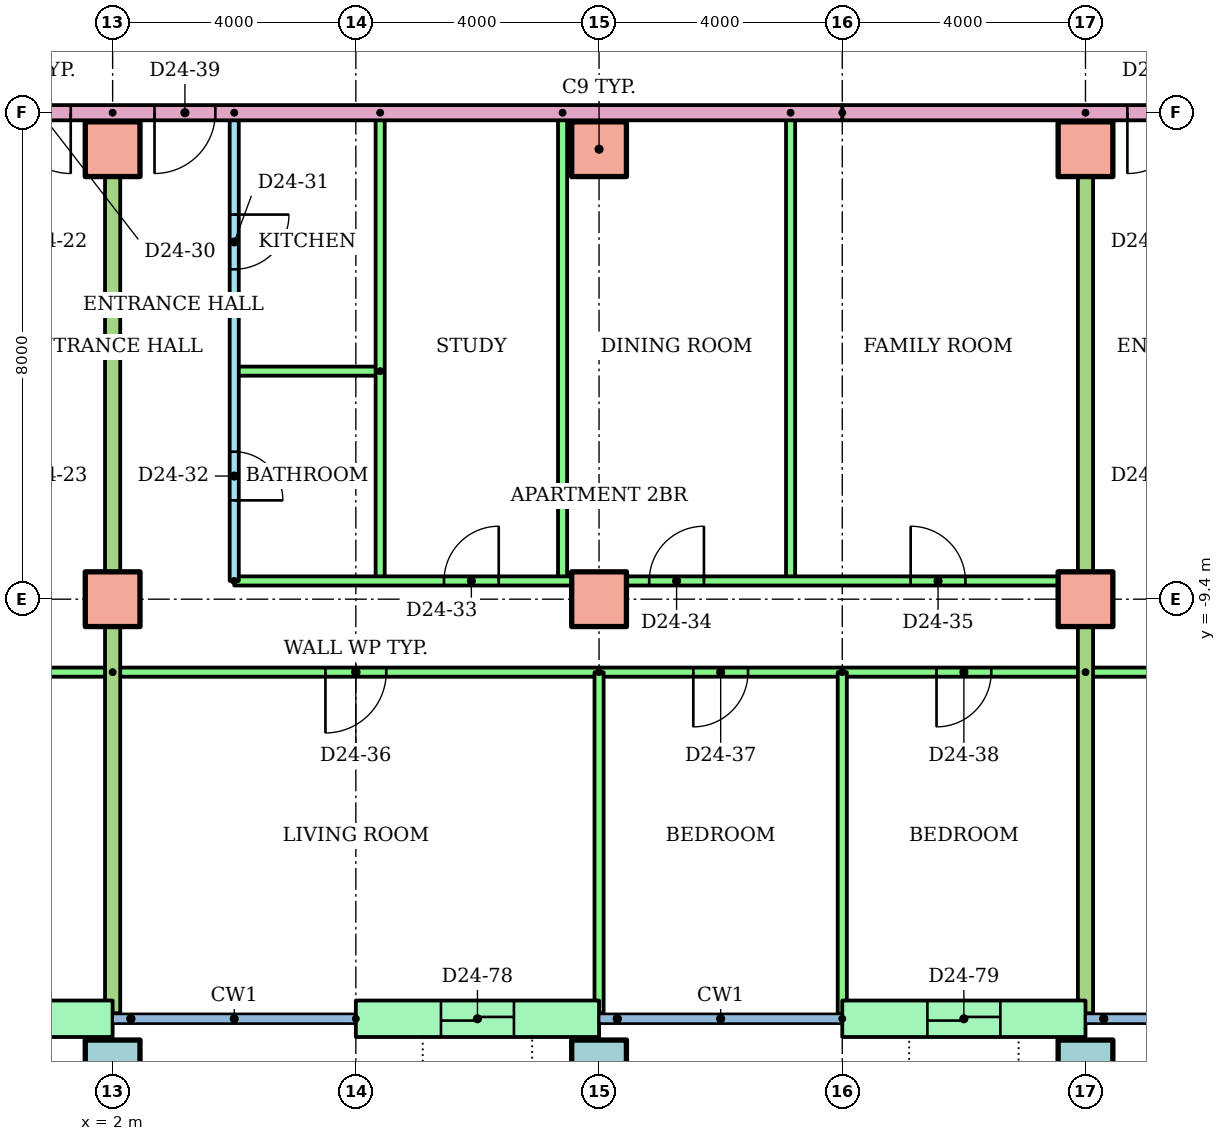
"""IFC4 building model, lengths in metres.
Left out: names, types, materials, properties, quantities, classifications, styles, units other than length and angle.
Written with IfcOpenShell. Run it as: python <this file> out.ifc"""

import sys

from ifc_helpers import new_model, si_unit, direction, frame, frame_2d, origin, origin_2d, place, context, subcontext, project, spatial, rectangle, hollow_rectangle, extrude, element, fill, save


model = new_model("IFC4")
c1 = context("Model", 3, precision=1e-05, world=origin(), true_north=direction((0.0, 1.0)))
c2 = subcontext(c1, "Body", "Model", "MODEL_VIEW")
j1 = project(units=[si_unit("LENGTHUNIT", "METRE"), si_unit("PLANEANGLEUNIT", "RADIAN")], contexts=[c1])
p1 = place(None, origin())
s1 = spatial("IfcSite", under=j1, at=p1, CompositionType="ELEMENT")
p2 = place(p1, origin())
s2 = spatial("IfcBuilding", under=s1, at=p2, CompositionType="ELEMENT")
p3 = place(p2, frame((0.0, 0.0, 93.5)))
s3 = spatial("IfcBuildingStorey", under=s2, at=p3, CompositionType="ELEMENT", Elevation=93.5)
for number, where in (
    (1, (2.0, -17.1, 0.0)),
    (2, (10.0, -17.1, 0.0)),
    (3, (18.0, -17.1, 0.0)),
):
    element("IfcColumn", number, at=place(p3, frame(where)), inside=s3, PredefinedType="COLUMN", context=c2, shape_type="SweptSolid", body=[
        extrude(hollow_rectangle(XDim=0.9, YDim=0.9, WallThickness=0.045, at=origin_2d()), origin(), (0.0, 0.0, 1.0), 3.2),
    ])
for number, where in (
    (4, (2.0, -9.4, 0.0)),
    (5, (10.0, -9.4, 0.0)),
    (6, (18.0, -9.4, 0.0)),
    (7, (2.0, -2.0, 0.0)),
    (8, (10.0, -2.0, 0.0)),
    (9, (18.0, -2.0, 0.0)),
):
    element("IfcColumn", number, at=place(p3, frame(where)), inside=s3, PredefinedType="COLUMN", context=c2, shape_type="SweptSolid", body=[
        extrude(rectangle(XDim=0.9, YDim=0.9, at=origin_2d()), origin(), (0.0, 0.0, 1.0), 3.2),
    ])
p4 = place(p3, frame((-2.0, -16.3, 0.0)))
e10 = element("IfcWall", 10, at=p4, inside=s3, PredefinedType="STANDARD", context=c2, shape_type="SweptSolid", body=[
    extrude(rectangle(XDim=4.0, YDim=0.6, at=frame_2d((2.0, 0.0))), origin(), (0.0, 0.0, 1.0), 2.92),
])
p5 = place(p4, frame((1.4, 0.0, 0.0)))
e11 = element("IfcOpeningElement", 11, at=p5, cuts=e10, PredefinedType="OPENING", context=c2, shape_type="SweptSolid", body=[
    extrude(rectangle(XDim=1.2, YDim=2.1, at=frame_2d((0.6, 1.05))), frame((0.0, 0.31, 0.0), z_axis=(0.0, -1.0, 0.0), x_axis=(1.0, 0.0, 0.0)), (0.0, 0.0, 1.0), 0.62),
])
p6 = place(p3, frame((6.0, -16.3, 0.0)))
e12 = element("IfcWall", 12, at=p6, inside=s3, PredefinedType="STANDARD", context=c2, shape_type="SweptSolid", body=[
    extrude(rectangle(XDim=4.0, YDim=0.6, at=frame_2d((2.0, 0.0))), origin(), (0.0, 0.0, 1.0), 2.92),
])
p7 = place(p6, frame((1.4, 0.0, 0.0)))
e13 = element("IfcOpeningElement", 13, at=p7, cuts=e12, PredefinedType="OPENING", context=c2, shape_type="SweptSolid", body=[
    extrude(rectangle(XDim=1.2, YDim=2.1, at=frame_2d((0.6, 1.05))), frame((0.0, 0.31, 0.0), z_axis=(0.0, -1.0, 0.0), x_axis=(1.0, 0.0, 0.0)), (0.0, 0.0, 1.0), 0.62),
])
p8 = place(p3, frame((14.0, -16.3, 0.0)))
e14 = element("IfcWall", 14, at=p8, inside=s3, PredefinedType="STANDARD", context=c2, shape_type="SweptSolid", body=[
    extrude(rectangle(XDim=4.0, YDim=0.6, at=frame_2d((2.0, 0.0))), origin(), (0.0, 0.0, 1.0), 2.92),
])
p9 = place(p8, frame((1.4, 0.0, 0.0)))
e15 = element("IfcOpeningElement", 15, at=p9, cuts=e14, PredefinedType="OPENING", context=c2, shape_type="SweptSolid", body=[
    extrude(rectangle(XDim=1.2, YDim=2.1, at=frame_2d((0.6, 1.05))), frame((0.0, 0.31, 0.0), z_axis=(0.0, -1.0, 0.0), x_axis=(1.0, 0.0, 0.0)), (0.0, 0.0, 1.0), 0.62),
])
p10 = place(p3, frame((2.0, -10.6, 0.0), z_axis=(0.0, 0.0, 1.0), x_axis=(-1.0, 0.0, 0.0)))
e16 = element("IfcWall", 16, at=p10, inside=s3, PredefinedType="PARTITIONING", context=c2, shape_type="SweptSolid", body=[
    extrude(rectangle(XDim=16.0, YDim=0.15, at=frame_2d((8.0, 0.0))), origin(), (0.0, 0.0, 1.0), 2.4),
])
p11 = place(p10, frame((13.55, 0.0, 0.0)))
e17 = element("IfcOpeningElement", 17, at=p11, cuts=e16, PredefinedType="OPENING", context=c2, shape_type="SweptSolid", body=[
    extrude(rectangle(XDim=0.9, YDim=2.1, at=frame_2d((0.45, 1.05))), frame((0.0, 0.085, 0.0), z_axis=(0.0, -1.0, 0.0), x_axis=(1.0, 0.0, 0.0)), (0.0, 0.0, 1.0), 0.17),
])
p12 = place(p10, frame((9.55, 0.0, 0.0)))
e18 = element("IfcOpeningElement", 18, at=p12, cuts=e16, PredefinedType="OPENING", context=c2, shape_type="SweptSolid", body=[
    extrude(rectangle(XDim=0.9, YDim=2.1, at=frame_2d((0.45, 1.05))), frame((0.0, 0.085, 0.0), z_axis=(0.0, -1.0, 0.0), x_axis=(1.0, 0.0, 0.0)), (0.0, 0.0, 1.0), 0.17),
])
p13 = place(p10, frame((3.5, 0.0, 0.0)))
e19 = element("IfcOpeningElement", 19, at=p13, cuts=e16, PredefinedType="OPENING", context=c2, shape_type="SweptSolid", body=[
    extrude(rectangle(XDim=1.0, YDim=2.1, at=frame_2d((0.5, 1.05))), frame((0.0, 0.085, 0.0), z_axis=(0.0, -1.0, 0.0), x_axis=(1.0, 0.0, 0.0)), (0.0, 0.0, 1.0), 0.17),
])
p14 = place(p3, frame((4.0, -1.4, 0.0), z_axis=(0.0, 0.0, 1.0), x_axis=(0.0, -1.0, 0.0)))
e20 = element("IfcWall", 20, at=p14, inside=s3, PredefinedType="PARTITIONING", context=c2, shape_type="SweptSolid", body=[
    extrude(rectangle(XDim=7.7, YDim=0.15, at=frame_2d((3.85, 0.0))), origin(), (0.0, 0.0, 1.0), 2.4),
])
p15 = place(p14, frame((1.675, 0.0, 0.0)))
e21 = element("IfcOpeningElement", 21, at=p15, cuts=e20, PredefinedType="OPENING", context=c2, shape_type="SweptSolid", body=[
    extrude(rectangle(XDim=0.9, YDim=2.1, at=frame_2d((0.45, 1.05))), frame((0.0, 0.085, 0.0), z_axis=(0.0, -1.0, 0.0), x_axis=(1.0, 0.0, 0.0)), (0.0, 0.0, 1.0), 0.17),
])
p16 = place(p14, frame((5.575, 0.0, 0.0)))
e22 = element("IfcOpeningElement", 22, at=p16, cuts=e20, PredefinedType="OPENING", context=c2, shape_type="SweptSolid", body=[
    extrude(rectangle(XDim=0.8, YDim=2.1, at=frame_2d((0.4, 1.05))), frame((0.0, 0.085, 0.0), z_axis=(0.0, -1.0, 0.0), x_axis=(1.0, 0.0, 0.0)), (0.0, 0.0, 1.0), 0.17),
])
p17 = place(p3, frame((6.4, -5.65, 0.0), z_axis=(0.0, 0.0, 1.0), x_axis=(-1.0, 0.0, 0.0)))
e23 = element("IfcWall", 23, at=p17, inside=s3, PredefinedType="PARTITIONING", context=c2, shape_type="SweptSolid", body=[
    extrude(rectangle(XDim=2.4, YDim=0.15, at=frame_2d((1.2, 0.0))), origin(), (0.0, 0.0, 1.0), 2.4),
])
for number, where, z_axis, x_axis in (
    (24, (6.4, -1.4, 0.0), (0.0, 0.0, 1.0), (0.0, -1.0, 0.0)),
    (25, (9.4, -1.4, 0.0), (0.0, 0.0, 1.0), (0.0, -1.0, 0.0)),
    (26, (13.15, -1.4, 0.0), (0.0, 0.0, 1.0), (0.0, -1.0, 0.0)),
):
    element("IfcWall", number, at=place(p3, frame(where, z_axis=z_axis, x_axis=x_axis)), inside=s3, PredefinedType="PARTITIONING", context=c2, shape_type="SweptSolid", body=[
        extrude(rectangle(XDim=7.7, YDim=0.15, at=frame_2d((3.85, 0.0))), origin(), (0.0, 0.0, 1.0), 2.4),
    ])
p18 = place(p3, frame((4.0, -9.1, 0.0)))
e27 = element("IfcWall", 27, at=p18, inside=s3, PredefinedType="PARTITIONING", context=c2, shape_type="SweptSolid", body=[
    extrude(rectangle(XDim=14.0, YDim=0.15, at=frame_2d((7.0, 0.0))), origin(), (0.0, 0.0, 1.0), 2.4),
])
p19 = place(p18, frame((3.45, 0.0, 0.0)))
e28 = element("IfcOpeningElement", 28, at=p19, cuts=e27, PredefinedType="OPENING", context=c2, shape_type="SweptSolid", body=[
    extrude(rectangle(XDim=0.9, YDim=2.1, at=frame_2d((0.45, 1.05))), frame((0.0, 0.085, 0.0), z_axis=(0.0, -1.0, 0.0), x_axis=(1.0, 0.0, 0.0)), (0.0, 0.0, 1.0), 0.17),
])
p20 = place(p18, frame((6.825, 0.0, 0.0)))
e29 = element("IfcOpeningElement", 29, at=p20, cuts=e27, PredefinedType="OPENING", context=c2, shape_type="SweptSolid", body=[
    extrude(rectangle(XDim=0.9, YDim=2.1, at=frame_2d((0.45, 1.05))), frame((0.0, 0.085, 0.0), z_axis=(0.0, -1.0, 0.0), x_axis=(1.0, 0.0, 0.0)), (0.0, 0.0, 1.0), 0.17),
])
p21 = place(p18, frame((11.125, 0.0, 0.0)))
e30 = element("IfcOpeningElement", 30, at=p21, cuts=e27, PredefinedType="OPENING", context=c2, shape_type="SweptSolid", body=[
    extrude(rectangle(XDim=0.9, YDim=2.1, at=frame_2d((0.45, 1.05))), frame((0.0, 0.085, 0.0), z_axis=(0.0, -1.0, 0.0), x_axis=(1.0, 0.0, 0.0)), (0.0, 0.0, 1.0), 0.17),
])
p22 = place(p3, frame((18.0, -10.6, 0.0), z_axis=(0.0, 0.0, 1.0), x_axis=(-1.0, 0.0, 0.0)))
e31 = element("IfcWall", 31, at=p22, inside=s3, PredefinedType="PARTITIONING", context=c2, shape_type="SweptSolid", body=[
    extrude(rectangle(XDim=16.0, YDim=0.15, at=frame_2d((8.0, 0.0))), origin(), (0.0, 0.0, 1.0), 2.4),
])
p23 = place(p22, frame((11.5, 0.0, 0.0)))
e32 = element("IfcOpeningElement", 32, at=p23, cuts=e31, PredefinedType="OPENING", context=c2, shape_type="SweptSolid", body=[
    extrude(rectangle(XDim=1.0, YDim=2.1, at=frame_2d((0.5, 1.05))), frame((0.0, 0.085, 0.0), z_axis=(0.0, -1.0, 0.0), x_axis=(1.0, 0.0, 0.0)), (0.0, 0.0, 1.0), 0.17),
])
p24 = place(p22, frame((5.55, 0.0, 0.0)))
e33 = element("IfcOpeningElement", 33, at=p24, cuts=e31, PredefinedType="OPENING", context=c2, shape_type="SweptSolid", body=[
    extrude(rectangle(XDim=0.9, YDim=2.1, at=frame_2d((0.45, 1.05))), frame((0.0, 0.085, 0.0), z_axis=(0.0, -1.0, 0.0), x_axis=(1.0, 0.0, 0.0)), (0.0, 0.0, 1.0), 0.17),
])
p25 = place(p22, frame((1.55, 0.0, 0.0)))
e34 = element("IfcOpeningElement", 34, at=p25, cuts=e31, PredefinedType="OPENING", context=c2, shape_type="SweptSolid", body=[
    extrude(rectangle(XDim=0.9, YDim=2.1, at=frame_2d((0.45, 1.05))), frame((0.0, 0.085, 0.0), z_axis=(0.0, -1.0, 0.0), x_axis=(1.0, 0.0, 0.0)), (0.0, 0.0, 1.0), 0.17),
])
p26 = place(p3, frame((10.0, -10.6, 0.0), z_axis=(0.0, 0.0, 1.0), x_axis=(0.0, -1.0, 0.0)))
e35 = element("IfcWall", 35, at=p26, inside=s3, PredefinedType="PARTITIONING", context=c2, shape_type="SweptSolid", body=[
    extrude(rectangle(XDim=5.61, YDim=0.15, at=frame_2d((2.805, 0.0))), origin(), (0.0, 0.0, 1.0), 2.4),
])
p27 = place(p3, frame((14.0, -10.6, 0.0), z_axis=(0.0, 0.0, 1.0), x_axis=(0.0, -1.0, 0.0)))
e36 = element("IfcWall", 36, at=p27, inside=s3, PredefinedType="PARTITIONING", context=c2, shape_type="SweptSolid", body=[
    extrude(rectangle(XDim=5.621, YDim=0.15, at=frame_2d((2.811, 0.0))), origin(), (0.0, 0.0, 1.0), 2.4),
])
p28 = place(p3, frame((2.0, -1.4, 0.0), z_axis=(0.0, 0.0, 1.0), x_axis=(0.0, -1.0, 0.0)))
e37 = element("IfcWall", 37, at=p28, inside=s3, PredefinedType="PARTITIONING", context=c2, shape_type="SweptSolid", body=[
    extrude(rectangle(XDim=14.81, YDim=0.25, at=frame_2d((7.405, 0.0))), origin(), (0.0, 0.0, 1.0), 2.4),
])
p29 = place(p3, frame((40.62, -10.6, 0.0), z_axis=(0.0, 0.0, 1.0), x_axis=(-1.0, 0.0, 0.0)))
e38 = element("IfcWall", 38, at=p29, inside=s3, PredefinedType="PARTITIONING", context=c2, shape_type="SweptSolid", body=[
    extrude(rectangle(XDim=22.62, YDim=0.15, at=frame_2d((11.31, 0.0))), origin(), (0.0, 0.0, 1.0), 2.4),
])
p30 = place(p29, frame((20.17, 0.0, 0.0)))
e39 = element("IfcOpeningElement", 39, at=p30, cuts=e38, PredefinedType="OPENING", context=c2, shape_type="SweptSolid", body=[
    extrude(rectangle(XDim=0.9, YDim=2.1, at=frame_2d((0.45, 1.05))), frame((0.0, 0.085, 0.0), z_axis=(0.0, -1.0, 0.0), x_axis=(1.0, 0.0, 0.0)), (0.0, 0.0, 1.0), 0.17),
])
p31 = place(p29, frame((16.12, 0.0, 0.0)))
e40 = element("IfcOpeningElement", 40, at=p31, cuts=e38, PredefinedType="OPENING", context=c2, shape_type="SweptSolid", body=[
    extrude(rectangle(XDim=1.0, YDim=2.1, at=frame_2d((0.5, 1.05))), frame((0.0, 0.085, 0.0), z_axis=(0.0, -1.0, 0.0), x_axis=(1.0, 0.0, 0.0)), (0.0, 0.0, 1.0), 0.17),
])
p32 = place(p29, frame((12.17, 0.0, 0.0)))
e41 = element("IfcOpeningElement", 41, at=p32, cuts=e38, PredefinedType="OPENING", context=c2, shape_type="SweptSolid", body=[
    extrude(rectangle(XDim=0.9, YDim=2.1, at=frame_2d((0.45, 1.05))), frame((0.0, 0.085, 0.0), z_axis=(0.0, -1.0, 0.0), x_axis=(1.0, 0.0, 0.0)), (0.0, 0.0, 1.0), 0.17),
])
p33 = place(p29, frame((8.17, 0.0, 0.0)))
e42 = element("IfcOpeningElement", 42, at=p33, cuts=e38, PredefinedType="OPENING", context=c2, shape_type="SweptSolid", body=[
    extrude(rectangle(XDim=0.9, YDim=2.1, at=frame_2d((0.45, 1.05))), frame((0.0, 0.085, 0.0), z_axis=(0.0, -1.0, 0.0), x_axis=(1.0, 0.0, 0.0)), (0.0, 0.0, 1.0), 0.17),
])
p34 = place(p29, frame((2.97, 0.0, 0.0)))
e43 = element("IfcOpeningElement", 43, at=p34, cuts=e38, PredefinedType="OPENING", context=c2, shape_type="SweptSolid", body=[
    extrude(rectangle(XDim=0.9, YDim=2.1, at=frame_2d((0.45, 1.05))), frame((0.0, 0.085, 0.0), z_axis=(0.0, -1.0, 0.0), x_axis=(1.0, 0.0, 0.0)), (0.0, 0.0, 1.0), 0.17),
])
p35 = place(p3, frame((18.0, -1.4, 0.0), z_axis=(0.0, 0.0, 1.0), x_axis=(0.0, -1.0, 0.0)))
e44 = element("IfcWall", 44, at=p35, inside=s3, PredefinedType="PARTITIONING", context=c2, shape_type="SweptSolid", body=[
    extrude(rectangle(XDim=14.81, YDim=0.25, at=frame_2d((7.405, 0.0))), origin(), (0.0, 0.0, 1.0), 2.4),
])
p36 = place(p3, frame((29.0, -1.4, 0.0), z_axis=(0.0, 0.0, 1.0), x_axis=(-1.0, 0.0, 0.0)))
e45 = element("IfcWall", 45, at=p36, inside=s3, PredefinedType="PARTITIONING", context=c2, shape_type="SweptSolid", body=[
    extrude(rectangle(XDim=15.0, YDim=0.25, at=frame_2d((7.5, 0.0))), origin(), (0.0, 0.0, 1.0), 2.4),
])
p37 = place(p36, frame((9.311, 0.0, 0.0)))
e46 = element("IfcOpeningElement", 46, at=p37, cuts=e45, PredefinedType="OPENING", context=c2, shape_type="SweptSolid", body=[
    extrude(rectangle(XDim=1.0, YDim=2.1, at=frame_2d((0.5, 1.05))), frame((0.0, 0.135, 0.0), z_axis=(0.0, -1.0, 0.0), x_axis=(1.0, 0.0, 0.0)), (0.0, 0.0, 1.0), 0.27),
])
p38 = place(p3, frame((14.0, -1.4, 0.0), z_axis=(0.0, 0.0, 1.0), x_axis=(-1.0, 0.0, 0.0)))
e47 = element("IfcWall", 47, at=p38, inside=s3, PredefinedType="PARTITIONING", context=c2, shape_type="SweptSolid", body=[
    extrude(rectangle(XDim=28.0, YDim=0.25, at=frame_2d((14.0, 0.0))), origin(), (0.0, 0.0, 1.0), 2.4),
])
p39 = place(p38, frame((12.689, 0.0, 0.0)))
e48 = element("IfcOpeningElement", 48, at=p39, cuts=e47, PredefinedType="OPENING", context=c2, shape_type="SweptSolid", body=[
    extrude(rectangle(XDim=1.0, YDim=2.1, at=frame_2d((0.5, 1.05))), frame((0.0, 0.135, 0.0), z_axis=(0.0, -1.0, 0.0), x_axis=(1.0, 0.0, 0.0)), (0.0, 0.0, 1.0), 0.27),
])
p40 = place(p38, frame((10.311, 0.0, 0.0)))
e49 = element("IfcOpeningElement", 49, at=p40, cuts=e47, PredefinedType="OPENING", context=c2, shape_type="SweptSolid", body=[
    extrude(rectangle(XDim=1.0, YDim=2.1, at=frame_2d((0.5, 1.05))), frame((0.0, 0.135, 0.0), z_axis=(0.0, -1.0, 0.0), x_axis=(1.0, 0.0, 0.0)), (0.0, 0.0, 1.0), 0.27),
])
p41 = place(p39, origin())
e50 = element("IfcDoor", 50, at=p41, inside=s3, OperationType="SINGLE_SWING_LEFT", PredefinedType="DOOR", context=c2, shape_type="SweptSolid", body=[
    extrude(rectangle(XDim=1.0, YDim=2.1, at=frame_2d((0.5, 1.05))), frame((0.0, 0.025, 0.0), z_axis=(0.0, -1.0, 0.0), x_axis=(1.0, 0.0, 0.0)), (0.0, 0.0, 1.0), 0.05),
])
fill(e48, e50)
p42 = place(p15, origin())
e51 = element("IfcDoor", 51, at=p42, inside=s3, OperationType="SINGLE_SWING_LEFT", PredefinedType="DOOR", context=c2, shape_type="SweptSolid", body=[
    extrude(rectangle(XDim=0.9, YDim=2.1, at=frame_2d((0.45, 1.05))), frame((0.0, 0.025, 0.0), z_axis=(0.0, -1.0, 0.0), x_axis=(1.0, 0.0, 0.0)), (0.0, 0.0, 1.0), 0.05),
])
fill(e21, e51)
p43 = place(p16, origin())
e52 = element("IfcDoor", 52, at=p43, inside=s3, OperationType="SINGLE_SWING_RIGHT", PredefinedType="DOOR", context=c2, shape_type="SweptSolid", body=[
    extrude(rectangle(XDim=0.8, YDim=2.1, at=frame_2d((0.4, 1.05))), frame((0.0, 0.025, 0.0), z_axis=(0.0, -1.0, 0.0), x_axis=(1.0, 0.0, 0.0)), (0.0, 0.0, 1.0), 0.05),
])
fill(e22, e52)
p44 = place(p19, origin())
e53 = element("IfcDoor", 53, at=p44, inside=s3, OperationType="SINGLE_SWING_RIGHT", PredefinedType="DOOR", context=c2, shape_type="SweptSolid", body=[
    extrude(rectangle(XDim=0.9, YDim=2.1, at=frame_2d((0.45, 1.05))), frame((0.0, 0.025, 0.0), z_axis=(0.0, -1.0, 0.0), x_axis=(1.0, 0.0, 0.0)), (0.0, 0.0, 1.0), 0.05),
])
fill(e28, e53)
p45 = place(p20, origin())
e54 = element("IfcDoor", 54, at=p45, inside=s3, OperationType="SINGLE_SWING_RIGHT", PredefinedType="DOOR", context=c2, shape_type="SweptSolid", body=[
    extrude(rectangle(XDim=0.9, YDim=2.1, at=frame_2d((0.45, 1.05))), frame((0.0, 0.025, 0.0), z_axis=(0.0, -1.0, 0.0), x_axis=(1.0, 0.0, 0.0)), (0.0, 0.0, 1.0), 0.05),
])
fill(e29, e54)
p46 = place(p21, origin())
e55 = element("IfcDoor", 55, at=p46, inside=s3, OperationType="SINGLE_SWING_LEFT", PredefinedType="DOOR", context=c2, shape_type="SweptSolid", body=[
    extrude(rectangle(XDim=0.9, YDim=2.1, at=frame_2d((0.45, 1.05))), frame((0.0, 0.025, 0.0), z_axis=(0.0, -1.0, 0.0), x_axis=(1.0, 0.0, 0.0)), (0.0, 0.0, 1.0), 0.05),
])
fill(e30, e55)
p47 = place(p23, origin())
e56 = element("IfcDoor", 56, at=p47, inside=s3, OperationType="SINGLE_SWING_RIGHT", PredefinedType="DOOR", context=c2, shape_type="SweptSolid", body=[
    extrude(rectangle(XDim=1.0, YDim=2.1, at=frame_2d((0.5, 1.05))), frame((0.0, 0.025, 0.0), z_axis=(0.0, -1.0, 0.0), x_axis=(1.0, 0.0, 0.0)), (0.0, 0.0, 1.0), 0.05),
])
fill(e32, e56)
p48 = place(p24, origin())
e57 = element("IfcDoor", 57, at=p48, inside=s3, OperationType="SINGLE_SWING_RIGHT", PredefinedType="DOOR", context=c2, shape_type="SweptSolid", body=[
    extrude(rectangle(XDim=0.9, YDim=2.1, at=frame_2d((0.45, 1.05))), frame((0.0, 0.025, 0.0), z_axis=(0.0, -1.0, 0.0), x_axis=(1.0, 0.0, 0.0)), (0.0, 0.0, 1.0), 0.05),
])
fill(e33, e57)
p49 = place(p25, origin())
e58 = element("IfcDoor", 58, at=p49, inside=s3, OperationType="SINGLE_SWING_RIGHT", PredefinedType="DOOR", context=c2, shape_type="SweptSolid", body=[
    extrude(rectangle(XDim=0.9, YDim=2.1, at=frame_2d((0.45, 1.05))), frame((0.0, 0.025, 0.0), z_axis=(0.0, -1.0, 0.0), x_axis=(1.0, 0.0, 0.0)), (0.0, 0.0, 1.0), 0.05),
])
fill(e34, e58)
p50 = place(p40, origin())
e59 = element("IfcDoor", 59, at=p50, inside=s3, OperationType="SINGLE_SWING_RIGHT", PredefinedType="DOOR", context=c2, shape_type="SweptSolid", body=[
    extrude(rectangle(XDim=1.0, YDim=2.1, at=frame_2d((0.5, 1.05))), frame((0.0, 0.025, 0.0), z_axis=(0.0, -1.0, 0.0), x_axis=(1.0, 0.0, 0.0)), (0.0, 0.0, 1.0), 0.05),
])
fill(e49, e59)
p51 = place(p37, origin())
e60 = element("IfcDoor", 60, at=p51, inside=s3, OperationType="SINGLE_SWING_RIGHT", PredefinedType="DOOR", context=c2, shape_type="SweptSolid", body=[
    extrude(rectangle(XDim=1.0, YDim=2.1, at=frame_2d((0.5, 1.05))), frame((0.0, 0.025, 0.0), z_axis=(0.0, -1.0, 0.0), x_axis=(1.0, 0.0, 0.0)), (0.0, 0.0, 1.0), 0.05),
])
fill(e46, e60)
p52 = place(p7, origin())
e61 = element("IfcDoor", 61, at=p52, inside=s3, OperationType="SLIDING_TO_LEFT", PredefinedType="DOOR", context=c2, shape_type="SweptSolid", body=[
    extrude(rectangle(XDim=1.2, YDim=2.1, at=frame_2d((0.6, 1.05))), frame((0.0, 0.025, 0.0), z_axis=(0.0, -1.0, 0.0), x_axis=(1.0, 0.0, 0.0)), (0.0, 0.0, 1.0), 0.05),
])
fill(e13, e61)
p53 = place(p9, origin())
e62 = element("IfcDoor", 62, at=p53, inside=s3, OperationType="SLIDING_TO_LEFT", PredefinedType="DOOR", context=c2, shape_type="SweptSolid", body=[
    extrude(rectangle(XDim=1.2, YDim=2.1, at=frame_2d((0.6, 1.05))), frame((0.0, 0.025, 0.0), z_axis=(0.0, -1.0, 0.0), x_axis=(1.0, 0.0, 0.0)), (0.0, 0.0, 1.0), 0.05),
])
fill(e15, e62)
save(model, sys.argv[1])
